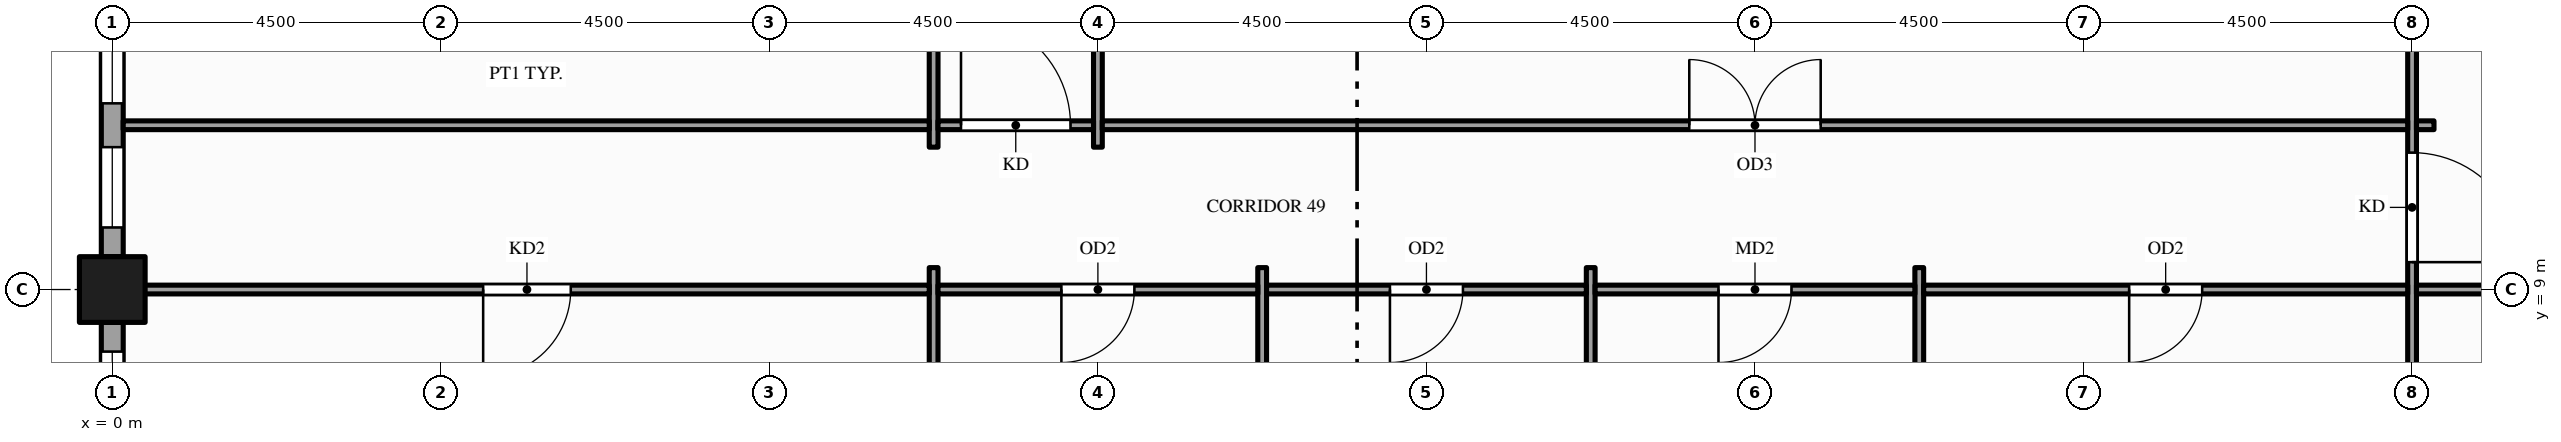
"""IFC4 building model, lengths in metres.
Left out: names, types, materials, properties, quantities, classifications, styles, units other than length and angle.
Written with IfcOpenShell. Run it as: python <this file> out.ifc"""

import sys

from ifc_helpers import new_model, si_unit, direction, frame, frame_2d, origin, origin_2d, place, context, subcontext, project, spatial, rectangle, hollow_rectangle, extrude, element, fill, save


model = new_model("IFC4")
c1 = context("Model", 3, precision=1e-05, world=origin(), true_north=direction((0.0, 1.0)))
c2 = subcontext(c1, "Body", "Model", "MODEL_VIEW")
j1 = project(units=[si_unit("LENGTHUNIT", "METRE"), si_unit("PLANEANGLEUNIT", "RADIAN")], contexts=[c1])
p1 = place(None, origin())
s1 = spatial("IfcSite", under=j1, at=p1, CompositionType="ELEMENT")
p2 = place(p1, origin())
s2 = spatial("IfcBuilding", under=s1, at=p2, CompositionType="ELEMENT")
p3 = place(p2, frame((0.0, 0.0, 151.0)))
s3 = spatial("IfcBuildingStorey", under=s2, at=p3, CompositionType="ELEMENT", Elevation=151.0)
p4 = place(p3, frame((0.0, 9.0, -0.15), z_axis=(0.0, 0.0, 1.0), x_axis=(1.0, 0.0, 0.0)))
e1 = element("IfcColumn", 1, at=p4, inside=s3, PredefinedType="COLUMN", context=c2, shape_type="SweptSolid", body=[
    extrude(hollow_rectangle(XDim=0.9, YDim=0.9, WallThickness=0.045, at=origin_2d()), origin(), (0.0, 0.0, 1.0), 4.0),
])
p5 = place(p3, frame((0.0, 13.05, 0.0), z_axis=(0.0, 0.0, 1.0), x_axis=(0.0, -1.0, 0.0)))
e2 = element("IfcWall", 2, at=p5, inside=s3, PredefinedType="STANDARD", context=c2, shape_type="SweptSolid", body=[
    extrude(rectangle(XDim=3.6, YDim=0.3, at=frame_2d((1.8, 0.0))), origin(), (0.0, 0.0, 1.0), 3.149),
])
p6 = place(p5, frame((0.4, 0.0, 0.9)))
e3 = element("IfcOpeningElement", 3, at=p6, cuts=e2, PredefinedType="OPENING", context=c2, shape_type="SweptSolid", body=[
    extrude(rectangle(XDim=1.1, YDim=2.0, at=frame_2d((0.55, 1.0))), frame((0.0, 0.16, 0.0), z_axis=(0.0, -1.0, 0.0), x_axis=(1.0, 0.0, 0.0)), (0.0, 0.0, 1.0), 0.32),
])
p7 = place(p5, frame((2.1, 0.0, 0.9)))
e4 = element("IfcOpeningElement", 4, at=p7, cuts=e2, PredefinedType="OPENING", context=c2, shape_type="SweptSolid", body=[
    extrude(rectangle(XDim=1.1, YDim=2.0, at=frame_2d((0.55, 1.0))), frame((0.0, 0.16, 0.0), z_axis=(0.0, -1.0, 0.0), x_axis=(1.0, 0.0, 0.0)), (0.0, 0.0, 1.0), 0.32),
])
p8 = place(p3, frame((0.0, 8.55, 0.0), z_axis=(0.0, 0.0, 1.0), x_axis=(0.0, -1.0, 0.0)))
e5 = element("IfcWall", 5, at=p8, inside=s3, PredefinedType="STANDARD", context=c2, shape_type="SweptSolid", body=[
    extrude(rectangle(XDim=3.6, YDim=0.3, at=frame_2d((1.8, 0.0))), origin(), (0.0, 0.0, 1.0), 3.149),
])
p9 = place(p8, frame((0.4, 0.0, 0.9)))
e6 = element("IfcOpeningElement", 6, at=p9, cuts=e5, PredefinedType="OPENING", context=c2, shape_type="SweptSolid", body=[
    extrude(rectangle(XDim=1.1, YDim=2.0, at=frame_2d((0.55, 1.0))), frame((0.0, 0.16, 0.0), z_axis=(0.0, -1.0, 0.0), x_axis=(1.0, 0.0, 0.0)), (0.0, 0.0, 1.0), 0.32),
])
p10 = place(p8, frame((2.1, 0.0, 0.9)))
e7 = element("IfcOpeningElement", 7, at=p10, cuts=e5, PredefinedType="OPENING", context=c2, shape_type="SweptSolid", body=[
    extrude(rectangle(XDim=1.1, YDim=2.0, at=frame_2d((0.55, 1.0))), frame((0.0, 0.16, 0.0), z_axis=(0.0, -1.0, 0.0), x_axis=(1.0, 0.0, 0.0)), (0.0, 0.0, 1.0), 0.32),
])
p11 = place(p3, frame((11.25, 0.15, 0.0), z_axis=(0.0, 0.0, 1.0), x_axis=(0.0, 1.0, 0.0)))
e8 = element("IfcWall", 8, at=p11, inside=s3, PredefinedType="PARTITIONING", context=c2, shape_type="SweptSolid", body=[
    extrude(rectangle(XDim=9.15, YDim=0.12, at=frame_2d((4.575, 0.0))), origin(), (0.0, 0.0, 1.0), 2.87),
])
p12 = place(p3, frame((11.25, 10.95, 0.0), z_axis=(0.0, 0.0, 1.0), x_axis=(0.0, 1.0, 0.0)))
e9 = element("IfcWall", 9, at=p12, inside=s3, PredefinedType="PARTITIONING", context=c2, shape_type="SweptSolid", body=[
    extrude(rectangle(XDim=20.85, YDim=0.12, at=frame_2d((10.425, 0.0))), origin(), (0.0, 0.0, 1.0), 2.6),
])
p13 = place(p12, frame((2.05, 0.0, 0.0)))
e10 = element("IfcOpeningElement", 10, at=p13, cuts=e9, PredefinedType="OPENING", context=c2, shape_type="SweptSolid", body=[
    extrude(rectangle(XDim=1.0, YDim=2.1, at=frame_2d((0.5, 1.05))), frame((0.0, 0.07, 0.0), z_axis=(0.0, -1.0, 0.0), x_axis=(1.0, 0.0, 0.0)), (0.0, 0.0, 1.0), 0.14),
])
p14 = place(p12, frame((6.55, 0.0, 0.0)))
e11 = element("IfcOpeningElement", 11, at=p14, cuts=e9, PredefinedType="OPENING", context=c2, shape_type="SweptSolid", body=[
    extrude(rectangle(XDim=1.0, YDim=2.1, at=frame_2d((0.5, 1.05))), frame((0.0, 0.07, 0.0), z_axis=(0.0, -1.0, 0.0), x_axis=(1.0, 0.0, 0.0)), (0.0, 0.0, 1.0), 0.14),
])
p15 = place(p12, frame((12.205, 0.0, 0.0)))
e12 = element("IfcOpeningElement", 12, at=p15, cuts=e9, PredefinedType="OPENING", context=c2, shape_type="SweptSolid", body=[
    extrude(rectangle(XDim=1.0, YDim=2.1, at=frame_2d((0.5, 1.05))), frame((0.0, 0.07, 0.0), z_axis=(0.0, -1.0, 0.0), x_axis=(1.0, 0.0, 0.0)), (0.0, 0.0, 1.0), 0.14),
])
p16 = place(p3, frame((13.5, 10.95, 0.0), z_axis=(0.0, 0.0, 1.0), x_axis=(0.0, 1.0, 0.0)))
e13 = element("IfcWall", 13, at=p16, inside=s3, PredefinedType="PARTITIONING", context=c2, shape_type="SweptSolid", body=[
    extrude(rectangle(XDim=20.85, YDim=0.12, at=frame_2d((10.425, 0.0))), origin(), (0.0, 0.0, 1.0), 2.6),
])
p17 = place(p16, frame((17.8, 0.0, 0.0)))
e14 = element("IfcOpeningElement", 14, at=p17, cuts=e13, PredefinedType="OPENING", context=c2, shape_type="SweptSolid", body=[
    extrude(rectangle(XDim=1.0, YDim=2.1, at=frame_2d((0.5, 1.05))), frame((0.0, 0.07, 0.0), z_axis=(0.0, -1.0, 0.0), x_axis=(1.0, 0.0, 0.0)), (0.0, 0.0, 1.0), 0.14),
])
p18 = place(p16, frame((4.2, 0.0, 0.0)))
e15 = element("IfcOpeningElement", 15, at=p18, cuts=e13, PredefinedType="OPENING", context=c2, shape_type="SweptSolid", body=[
    extrude(rectangle(XDim=1.2, YDim=2.1, at=frame_2d((0.6, 1.05))), frame((0.0, 0.07, 0.0), z_axis=(0.0, -1.0, 0.0), x_axis=(1.0, 0.0, 0.0)), (0.0, 0.0, 1.0), 0.14),
])
for number, where, z_axis, x_axis in (
    (16, (15.75, 0.15, 0.0), (0.0, 0.0, 1.0), (0.0, 1.0, 0.0)),
    (17, (20.25, 0.15, 0.0), (0.0, 0.0, 1.0), (0.0, 1.0, 0.0)),
):
    element("IfcWall", number, at=place(p3, frame(where, z_axis=z_axis, x_axis=x_axis)), inside=s3, PredefinedType="PARTITIONING", context=c2, shape_type="SweptSolid", body=[
        extrude(rectangle(XDim=9.15, YDim=0.12, at=frame_2d((4.575, 0.0))), origin(), (0.0, 0.0, 1.0), 2.87),
    ])
p19 = place(p3, frame((24.75, 1.65, 0.0), z_axis=(0.0, 0.0, 1.0), x_axis=(0.0, 1.0, 0.0)))
e18 = element("IfcWall", 18, at=p19, inside=s3, PredefinedType="PARTITIONING", context=c2, shape_type="SweptSolid", body=[
    extrude(rectangle(XDim=7.65, YDim=0.12, at=frame_2d((3.825, 0.0))), origin(), (0.0, 0.0, 1.0), 2.87),
])
p20 = place(p3, frame((31.5, 1.65, 0.0), z_axis=(0.0, 0.0, 1.0), x_axis=(0.0, 1.0, 0.0)))
e19 = element("IfcWall", 19, at=p20, inside=s3, PredefinedType="PARTITIONING", context=c2, shape_type="SweptSolid", body=[
    extrude(rectangle(XDim=22.2, YDim=0.12, at=frame_2d((11.1, 0.0))), origin(), (0.0, 0.0, 1.0), 2.87),
])
p21 = place(p20, frame((7.725, 0.0, 0.0)))
e20 = element("IfcOpeningElement", 20, at=p21, cuts=e19, PredefinedType="OPENING", context=c2, shape_type="SweptSolid", body=[
    extrude(rectangle(XDim=1.5, YDim=2.1, at=frame_2d((0.75, 1.05))), frame((0.0, 0.07, 0.0), z_axis=(0.0, -1.0, 0.0), x_axis=(1.0, 0.0, 0.0)), (0.0, 0.0, 1.0), 0.14),
])
p22 = place(p3, frame((0.15, 9.0, 0.0), z_axis=(0.0, 0.0, 1.0), x_axis=(1.0, 0.0, 0.0)))
e21 = element("IfcWall", 21, at=p22, inside=s3, PredefinedType="PARTITIONING", context=c2, shape_type="SweptSolid", body=[
    extrude(rectangle(XDim=11.04, YDim=0.12, at=frame_2d((5.52, 0.0))), origin(), (0.0, 0.0, 1.0), 2.87),
])
p23 = place(p22, frame((4.93, 0.0, 0.0)))
e22 = element("IfcOpeningElement", 22, at=p23, cuts=e21, PredefinedType="OPENING", context=c2, shape_type="SweptSolid", body=[
    extrude(rectangle(XDim=1.2, YDim=2.1, at=frame_2d((0.6, 1.05))), frame((0.0, 0.07, 0.0), z_axis=(0.0, -1.0, 0.0), x_axis=(1.0, 0.0, 0.0)), (0.0, 0.0, 1.0), 0.14),
])
p24 = place(p3, frame((11.31, 9.0, 0.0), z_axis=(0.0, 0.0, 1.0), x_axis=(1.0, 0.0, 0.0)))
e23 = element("IfcWall", 23, at=p24, inside=s3, PredefinedType="PARTITIONING", context=c2, shape_type="SweptSolid", body=[
    extrude(rectangle(XDim=4.38, YDim=0.12, at=frame_2d((2.19, 0.0))), origin(), (0.0, 0.0, 1.0), 2.87),
])
p25 = place(p24, frame((1.69, 0.0, 0.0)))
e24 = element("IfcOpeningElement", 24, at=p25, cuts=e23, PredefinedType="OPENING", context=c2, shape_type="SweptSolid", body=[
    extrude(rectangle(XDim=1.0, YDim=2.1, at=frame_2d((0.5, 1.05))), frame((0.0, 0.07, 0.0), z_axis=(0.0, -1.0, 0.0), x_axis=(1.0, 0.0, 0.0)), (0.0, 0.0, 1.0), 0.14),
])
p26 = place(p3, frame((15.81, 9.0, 0.0), z_axis=(0.0, 0.0, 1.0), x_axis=(1.0, 0.0, 0.0)))
e25 = element("IfcWall", 25, at=p26, inside=s3, PredefinedType="PARTITIONING", context=c2, shape_type="SweptSolid", body=[
    extrude(rectangle(XDim=4.38, YDim=0.12, at=frame_2d((2.19, 0.0))), origin(), (0.0, 0.0, 1.0), 2.87),
])
p27 = place(p26, frame((1.69, 0.0, 0.0)))
e26 = element("IfcOpeningElement", 26, at=p27, cuts=e25, PredefinedType="OPENING", context=c2, shape_type="SweptSolid", body=[
    extrude(rectangle(XDim=1.0, YDim=2.1, at=frame_2d((0.5, 1.05))), frame((0.0, 0.07, 0.0), z_axis=(0.0, -1.0, 0.0), x_axis=(1.0, 0.0, 0.0)), (0.0, 0.0, 1.0), 0.14),
])
p28 = place(p3, frame((20.31, 9.0, 0.0), z_axis=(0.0, 0.0, 1.0), x_axis=(1.0, 0.0, 0.0)))
e27 = element("IfcWall", 27, at=p28, inside=s3, PredefinedType="PARTITIONING", context=c2, shape_type="SweptSolid", body=[
    extrude(rectangle(XDim=4.38, YDim=0.12, at=frame_2d((2.19, 0.0))), origin(), (0.0, 0.0, 1.0), 2.87),
])
p29 = place(p28, frame((1.69, 0.0, 0.0)))
e28 = element("IfcOpeningElement", 28, at=p29, cuts=e27, PredefinedType="OPENING", context=c2, shape_type="SweptSolid", body=[
    extrude(rectangle(XDim=1.0, YDim=2.1, at=frame_2d((0.5, 1.05))), frame((0.0, 0.07, 0.0), z_axis=(0.0, -1.0, 0.0), x_axis=(1.0, 0.0, 0.0)), (0.0, 0.0, 1.0), 0.14),
])
p30 = place(p3, frame((24.81, 9.0, 0.0), z_axis=(0.0, 0.0, 1.0), x_axis=(1.0, 0.0, 0.0)))
e29 = element("IfcWall", 29, at=p30, inside=s3, PredefinedType="PARTITIONING", context=c2, shape_type="SweptSolid", body=[
    extrude(rectangle(XDim=6.63, YDim=0.12, at=frame_2d((3.315, 0.0))), origin(), (0.0, 0.0, 1.0), 2.87),
])
p31 = place(p30, frame((2.815, 0.0, 0.0)))
e30 = element("IfcOpeningElement", 30, at=p31, cuts=e29, PredefinedType="OPENING", context=c2, shape_type="SweptSolid", body=[
    extrude(rectangle(XDim=1.0, YDim=2.1, at=frame_2d((0.5, 1.05))), frame((0.0, 0.07, 0.0), z_axis=(0.0, -1.0, 0.0), x_axis=(1.0, 0.0, 0.0)), (0.0, 0.0, 1.0), 0.14),
])
p32 = place(p3, frame((31.56, 9.0, 0.0), z_axis=(0.0, 0.0, 1.0), x_axis=(1.0, 0.0, 0.0)))
e31 = element("IfcWall", 31, at=p32, inside=s3, PredefinedType="PARTITIONING", context=c2, shape_type="SweptSolid", body=[
    extrude(rectangle(XDim=13.38, YDim=0.12, at=frame_2d((6.69, 0.0))), origin(), (0.0, 0.0, 1.0), 2.87),
])
p33 = place(p32, frame((5.79, 0.0, 0.0)))
e32 = element("IfcOpeningElement", 32, at=p33, cuts=e31, PredefinedType="OPENING", context=c2, shape_type="SweptSolid", body=[
    extrude(rectangle(XDim=1.8, YDim=2.1, at=frame_2d((0.9, 1.05))), frame((0.0, 0.07, 0.0), z_axis=(0.0, -1.0, 0.0), x_axis=(1.0, 0.0, 0.0)), (0.0, 0.0, 1.0), 0.14),
])
p34 = place(p3, frame((0.15, 11.25, 0.0), z_axis=(0.0, 0.0, 1.0), x_axis=(1.0, 0.0, 0.0)))
e33 = element("IfcWall", 33, at=p34, inside=s3, PredefinedType="PARTITIONING", context=c2, shape_type="SweptSolid", body=[
    extrude(rectangle(XDim=11.04, YDim=0.12, at=frame_2d((5.52, 0.0))), origin(), (0.0, 0.0, 1.0), 2.87),
])
p35 = place(p3, frame((11.31, 11.25, 0.0), z_axis=(0.0, 0.0, 1.0), x_axis=(1.0, 0.0, 0.0)))
e34 = element("IfcWall", 34, at=p35, inside=s3, PredefinedType="PARTITIONING", context=c2, shape_type="SweptSolid", body=[
    extrude(rectangle(XDim=2.13, YDim=0.12, at=frame_2d((1.065, 0.0))), origin(), (0.0, 0.0, 1.0), 2.87),
])
p36 = place(p35, frame((0.315, 0.0, 0.0)))
e35 = element("IfcOpeningElement", 35, at=p36, cuts=e34, PredefinedType="OPENING", context=c2, shape_type="SweptSolid", body=[
    extrude(rectangle(XDim=1.5, YDim=2.1, at=frame_2d((0.75, 1.05))), frame((0.0, 0.07, 0.0), z_axis=(0.0, -1.0, 0.0), x_axis=(1.0, 0.0, 0.0)), (0.0, 0.0, 1.0), 0.14),
])
p37 = place(p3, frame((13.56, 11.25, 0.0), z_axis=(0.0, 0.0, 1.0), x_axis=(1.0, 0.0, 0.0)))
e36 = element("IfcWall", 36, at=p37, inside=s3, PredefinedType="PARTITIONING", context=c2, shape_type="SweptSolid", body=[
    extrude(rectangle(XDim=17.88, YDim=0.12, at=frame_2d((8.94, 0.0))), origin(), (0.0, 0.0, 1.0), 2.87),
])
p38 = place(p37, frame((8.04, 0.0, 0.0)))
e37 = element("IfcOpeningElement", 37, at=p38, cuts=e36, PredefinedType="OPENING", context=c2, shape_type="SweptSolid", body=[
    extrude(rectangle(XDim=1.8, YDim=2.1, at=frame_2d((0.9, 1.05))), frame((0.0, 0.07, 0.0), z_axis=(0.0, -1.0, 0.0), x_axis=(1.0, 0.0, 0.0)), (0.0, 0.0, 1.0), 0.14),
])
p39 = place(p3, frame((31.56, 11.25, 0.0), z_axis=(0.0, 0.0, 1.0), x_axis=(1.0, 0.0, 0.0)))
e38 = element("IfcWall", 38, at=p39, inside=s3, PredefinedType="PARTITIONING", context=c2, shape_type="SweptSolid", body=[
    extrude(rectangle(XDim=0.24, YDim=0.12, at=frame_2d((0.12, 0.0))), origin(), (0.0, 0.0, 1.0), 2.87),
])
p40 = place(p6, origin())
e39 = element("IfcWindow", 39, at=p40, inside=s3, PartitioningType="SINGLE_PANEL", PredefinedType="WINDOW", context=c2, shape_type="SweptSolid", body=[
    extrude(rectangle(XDim=1.1, YDim=2.0, at=frame_2d((0.55, 1.0))), frame((0.0, 0.03, 0.0), z_axis=(0.0, -1.0, 0.0), x_axis=(1.0, 0.0, 0.0)), (0.0, 0.0, 1.0), 0.06),
])
fill(e3, e39)
p41 = place(p7, origin())
e40 = element("IfcWindow", 40, at=p41, inside=s3, PartitioningType="SINGLE_PANEL", PredefinedType="WINDOW", context=c2, shape_type="SweptSolid", body=[
    extrude(rectangle(XDim=1.1, YDim=2.0, at=frame_2d((0.55, 1.0))), frame((0.0, 0.03, 0.0), z_axis=(0.0, -1.0, 0.0), x_axis=(1.0, 0.0, 0.0)), (0.0, 0.0, 1.0), 0.06),
])
fill(e4, e40)
p42 = place(p9, origin())
e41 = element("IfcWindow", 41, at=p42, inside=s3, PartitioningType="SINGLE_PANEL", PredefinedType="WINDOW", context=c2, shape_type="SweptSolid", body=[
    extrude(rectangle(XDim=1.1, YDim=2.0, at=frame_2d((0.55, 1.0))), frame((0.0, 0.03, 0.0), z_axis=(0.0, -1.0, 0.0), x_axis=(1.0, 0.0, 0.0)), (0.0, 0.0, 1.0), 0.06),
])
fill(e6, e41)
p43 = place(p21, origin())
e42 = element("IfcDoor", 42, at=p43, inside=s3, OperationType="SINGLE_SWING_LEFT", PredefinedType="DOOR", context=c2, shape_type="SweptSolid", body=[
    extrude(rectangle(XDim=1.5, YDim=2.1, at=frame_2d((0.75, 1.05))), frame((0.0, 0.025, 0.0), z_axis=(0.0, -1.0, 0.0), x_axis=(1.0, 0.0, 0.0)), (0.0, 0.0, 1.0), 0.05),
])
fill(e20, e42)
p44 = place(p23, origin())
e43 = element("IfcDoor", 43, at=p44, inside=s3, OperationType="SINGLE_SWING_LEFT", PredefinedType="DOOR", context=c2, shape_type="SweptSolid", body=[
    extrude(rectangle(XDim=1.2, YDim=2.1, at=frame_2d((0.6, 1.05))), frame((0.0, 0.025, 0.0), z_axis=(0.0, -1.0, 0.0), x_axis=(1.0, 0.0, 0.0)), (0.0, 0.0, 1.0), 0.05),
])
fill(e22, e43)
p45 = place(p25, origin())
e44 = element("IfcDoor", 44, at=p45, inside=s3, OperationType="SINGLE_SWING_LEFT", PredefinedType="DOOR", context=c2, shape_type="SweptSolid", body=[
    extrude(rectangle(XDim=1.0, YDim=2.1, at=frame_2d((0.5, 1.05))), frame((0.0, 0.025, 0.0), z_axis=(0.0, -1.0, 0.0), x_axis=(1.0, 0.0, 0.0)), (0.0, 0.0, 1.0), 0.05),
])
fill(e24, e44)
p46 = place(p27, origin())
e45 = element("IfcDoor", 45, at=p46, inside=s3, OperationType="SINGLE_SWING_LEFT", PredefinedType="DOOR", context=c2, shape_type="SweptSolid", body=[
    extrude(rectangle(XDim=1.0, YDim=2.1, at=frame_2d((0.5, 1.05))), frame((0.0, 0.025, 0.0), z_axis=(0.0, -1.0, 0.0), x_axis=(1.0, 0.0, 0.0)), (0.0, 0.0, 1.0), 0.05),
])
fill(e26, e45)
p47 = place(p29, origin())
e46 = element("IfcDoor", 46, at=p47, inside=s3, OperationType="SINGLE_SWING_LEFT", PredefinedType="DOOR", context=c2, shape_type="SweptSolid", body=[
    extrude(rectangle(XDim=1.0, YDim=2.1, at=frame_2d((0.5, 1.05))), frame((0.0, 0.025, 0.0), z_axis=(0.0, -1.0, 0.0), x_axis=(1.0, 0.0, 0.0)), (0.0, 0.0, 1.0), 0.05),
])
fill(e28, e46)
p48 = place(p31, origin())
e47 = element("IfcDoor", 47, at=p48, inside=s3, OperationType="SINGLE_SWING_LEFT", PredefinedType="DOOR", context=c2, shape_type="SweptSolid", body=[
    extrude(rectangle(XDim=1.0, YDim=2.1, at=frame_2d((0.5, 1.05))), frame((0.0, 0.025, 0.0), z_axis=(0.0, -1.0, 0.0), x_axis=(1.0, 0.0, 0.0)), (0.0, 0.0, 1.0), 0.05),
])
fill(e30, e47)
p49 = place(p38, origin())
e48 = element("IfcDoor", 48, at=p49, inside=s3, OperationType="DOUBLE_DOOR_SINGLE_SWING", PredefinedType="DOOR", context=c2, shape_type="SweptSolid", body=[
    extrude(rectangle(XDim=1.8, YDim=2.1, at=frame_2d((0.9, 1.05))), frame((0.0, 0.025, 0.0), z_axis=(0.0, -1.0, 0.0), x_axis=(1.0, 0.0, 0.0)), (0.0, 0.0, 1.0), 0.05),
])
fill(e37, e48)
p50 = place(p36, origin())
e49 = element("IfcDoor", 49, at=p50, inside=s3, OperationType="SINGLE_SWING_LEFT", PredefinedType="DOOR", context=c2, shape_type="SweptSolid", body=[
    extrude(rectangle(XDim=1.5, YDim=2.1, at=frame_2d((0.75, 1.05))), frame((0.0, 0.025, 0.0), z_axis=(0.0, -1.0, 0.0), x_axis=(1.0, 0.0, 0.0)), (0.0, 0.0, 1.0), 0.05),
])
fill(e35, e49)
save(model, sys.argv[1])
